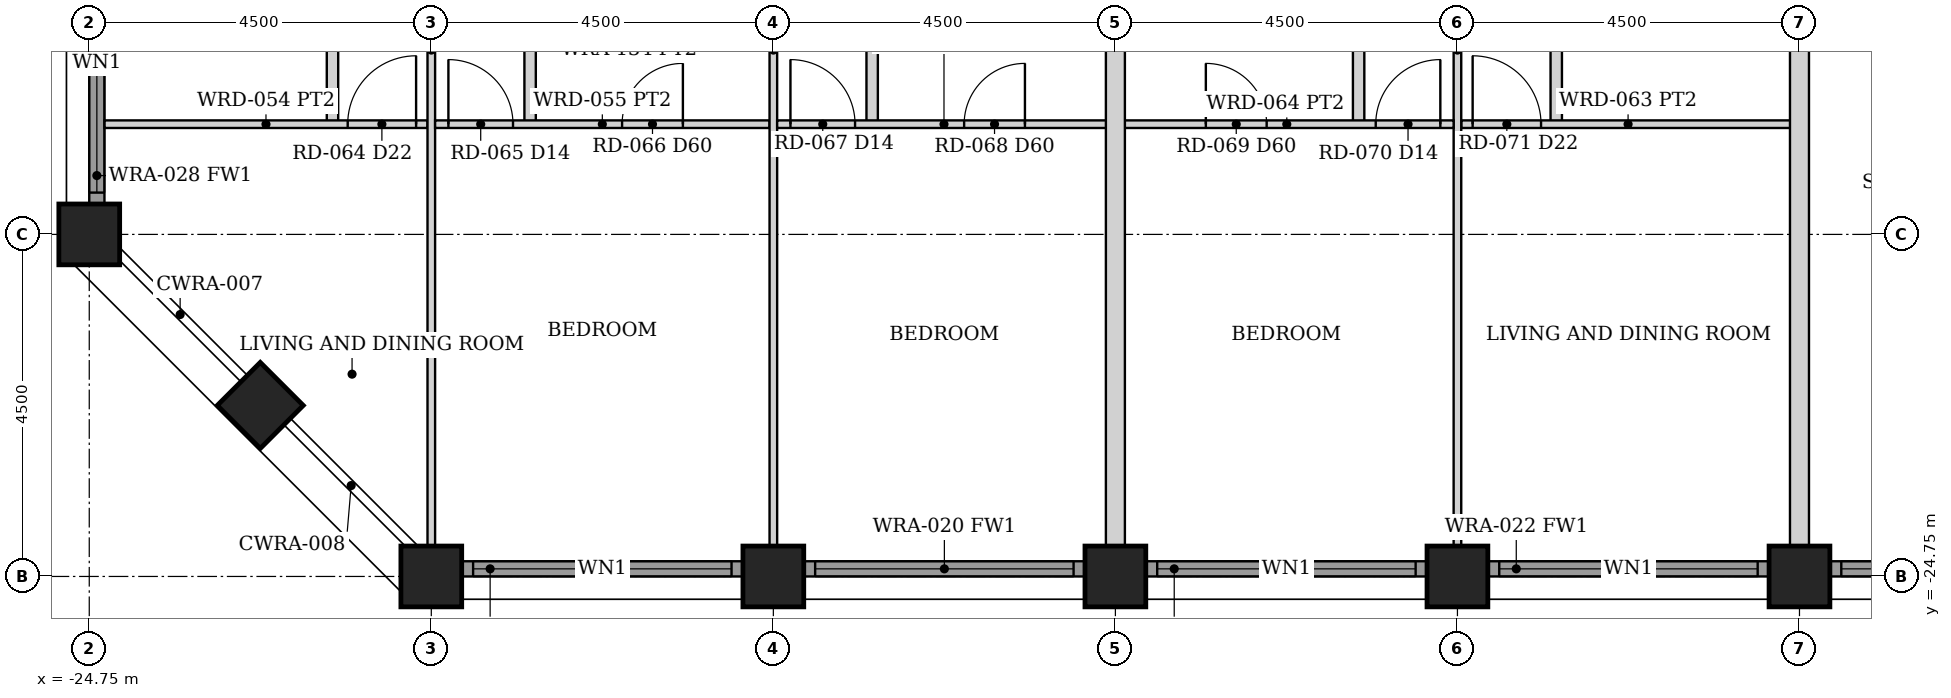
"""IFC4 building model, lengths in metres.
Left out: names, types, materials, properties, quantities, classifications, styles, units other than length and angle.
Written with IfcOpenShell. Run it as: python <this file> out.ifc"""

import sys

from ifc_helpers import new_model, si_unit, direction, frame, frame_2d, origin, origin_2d, place, context, subcontext, project, spatial, rectangle, hollow_rectangle, extrude, element, fill, save


model = new_model("IFC4")
c1 = context("Model", 3, precision=1e-05, world=origin(), true_north=direction((0.0, 1.0)))
c2 = subcontext(c1, "Body", "Model", "MODEL_VIEW")
j1 = project(units=[si_unit("LENGTHUNIT", "METRE"), si_unit("PLANEANGLEUNIT", "RADIAN")], contexts=[c1])
p1 = place(None, origin())
s1 = spatial("IfcSite", under=j1, at=p1, CompositionType="ELEMENT")
p2 = place(p1, origin())
s2 = spatial("IfcBuilding", under=s1, at=p2, CompositionType="ELEMENT")
p3 = place(p2, frame((0.0, 0.0, 58.0)))
s3 = spatial("IfcBuildingStorey", under=s2, at=p3, CompositionType="ELEMENT", Elevation=58.0)
for number, where, z_axis, x_axis in (
    (1, (-20.25, -24.75, 0.0), (0.0, 0.0, 1.0), (0.0, 1.0, 0.0)),
    (2, (-24.75, -20.25, 0.0), (0.0, 0.0, 1.0), (1.0, 0.0, 0.0)),
    (3, (-15.75, -24.75, 0.0), (0.0, 0.0, 1.0), (0.0, 1.0, 0.0)),
    (4, (-11.25, -24.75, 0.0), (0.0, 0.0, 1.0), (0.0, 1.0, 0.0)),
    (5, (-6.75, -24.75, 0.0), (0.0, 0.0, 1.0), (0.0, 1.0, 0.0)),
    (6, (-2.25, -24.75, 0.0), (0.0, 0.0, 1.0), (0.0, 1.0, 0.0)),
    (7, (-22.5, -22.5, 0.0), (0.0, 0.0, 1.0), (0.707, 0.707, 0.0)),
):
    element("IfcColumn", number, at=place(p3, frame(where, z_axis=z_axis, x_axis=x_axis)), inside=s3, PredefinedType="COLUMN", context=c2, shape_type="SweptSolid", body=[
        extrude(hollow_rectangle(XDim=0.8, YDim=0.8, WallThickness=0.06, at=origin_2d()), origin(), (0.0, 0.0, 1.0), 3.5),
    ])
p4 = place(p3, frame((-19.845, -24.65, 0.0), z_axis=(0.0, 0.0, 1.0), x_axis=(1.0, 0.0, 0.0)))
e8 = element("IfcWall", 8, at=p4, inside=s3, PredefinedType="SOLIDWALL", context=c2, shape_type="SweptSolid", body=[
    extrude(rectangle(XDim=3.69, YDim=0.2, at=frame_2d((1.845, 0.0))), origin(), (0.0, 0.0, 1.0), 2.379),
])
p5 = place(p4, frame((0.145, 0.0, 0.3)))
e9 = element("IfcOpeningElement", 9, at=p5, cuts=e8, PredefinedType="OPENING", context=c2, shape_type="SweptSolid", body=[
    extrude(rectangle(XDim=3.4, YDim=1.929, at=frame_2d((1.7, 0.964))), frame((0.0, 0.11, 0.0), z_axis=(0.0, -1.0, 0.0), x_axis=(1.0, 0.0, 0.0)), (0.0, 0.0, 1.0), 0.22),
])
p6 = place(p3, frame((-15.345, -24.65, 0.0), z_axis=(0.0, 0.0, 1.0), x_axis=(1.0, 0.0, 0.0)))
e10 = element("IfcWall", 10, at=p6, inside=s3, PredefinedType="SOLIDWALL", context=c2, shape_type="SweptSolid", body=[
    extrude(rectangle(XDim=3.69, YDim=0.2, at=frame_2d((1.845, 0.0))), origin(), (0.0, 0.0, 1.0), 2.379),
])
p7 = place(p6, frame((0.145, 0.0, 0.3)))
e11 = element("IfcOpeningElement", 11, at=p7, cuts=e10, PredefinedType="OPENING", context=c2, shape_type="SweptSolid", body=[
    extrude(rectangle(XDim=3.4, YDim=1.929, at=frame_2d((1.7, 0.964))), frame((0.0, 0.11, 0.0), z_axis=(0.0, -1.0, 0.0), x_axis=(1.0, 0.0, 0.0)), (0.0, 0.0, 1.0), 0.22),
])
p8 = place(p3, frame((-10.845, -24.65, 0.0), z_axis=(0.0, 0.0, 1.0), x_axis=(1.0, 0.0, 0.0)))
e12 = element("IfcWall", 12, at=p8, inside=s3, PredefinedType="SOLIDWALL", context=c2, shape_type="SweptSolid", body=[
    extrude(rectangle(XDim=3.69, YDim=0.2, at=frame_2d((1.845, 0.0))), origin(), (0.0, 0.0, 1.0), 2.379),
])
p9 = place(p8, frame((0.145, 0.0, 0.3)))
e13 = element("IfcOpeningElement", 13, at=p9, cuts=e12, PredefinedType="OPENING", context=c2, shape_type="SweptSolid", body=[
    extrude(rectangle(XDim=3.4, YDim=1.929, at=frame_2d((1.7, 0.964))), frame((0.0, 0.11, 0.0), z_axis=(0.0, -1.0, 0.0), x_axis=(1.0, 0.0, 0.0)), (0.0, 0.0, 1.0), 0.22),
])
p10 = place(p3, frame((-6.345, -24.65, 0.0), z_axis=(0.0, 0.0, 1.0), x_axis=(1.0, 0.0, 0.0)))
e14 = element("IfcWall", 14, at=p10, inside=s3, PredefinedType="SOLIDWALL", context=c2, shape_type="SweptSolid", body=[
    extrude(rectangle(XDim=3.69, YDim=0.2, at=frame_2d((1.845, 0.0))), origin(), (0.0, 0.0, 1.0), 2.379),
])
p11 = place(p10, frame((0.145, 0.0, 0.3)))
e15 = element("IfcOpeningElement", 15, at=p11, cuts=e14, PredefinedType="OPENING", context=c2, shape_type="SweptSolid", body=[
    extrude(rectangle(XDim=3.4, YDim=1.929, at=frame_2d((1.7, 0.964))), frame((0.0, 0.11, 0.0), z_axis=(0.0, -1.0, 0.0), x_axis=(1.0, 0.0, 0.0)), (0.0, 0.0, 1.0), 0.22),
])
p12 = place(p3, frame((-1.845, -24.65, 0.0), z_axis=(0.0, 0.0, 1.0), x_axis=(1.0, 0.0, 0.0)))
e16 = element("IfcWall", 16, at=p12, inside=s3, PredefinedType="SOLIDWALL", context=c2, shape_type="SweptSolid", body=[
    extrude(rectangle(XDim=3.69, YDim=0.2, at=frame_2d((1.845, 0.0))), origin(), (0.0, 0.0, 1.0), 2.379),
])
p13 = place(p12, frame((0.145, 0.0, 0.3)))
e17 = element("IfcOpeningElement", 17, at=p13, cuts=e16, PredefinedType="OPENING", context=c2, shape_type="SweptSolid", body=[
    extrude(rectangle(XDim=3.4, YDim=1.929, at=frame_2d((1.7, 0.964))), frame((0.0, 0.11, 0.0), z_axis=(0.0, -1.0, 0.0), x_axis=(1.0, 0.0, 0.0)), (0.0, 0.0, 1.0), 0.22),
])
p14 = place(p3, frame((-24.65, -19.845, 0.0), z_axis=(0.0, 0.0, 1.0), x_axis=(0.0, 1.0, 0.0)))
e18 = element("IfcWall", 18, at=p14, inside=s3, PredefinedType="SOLIDWALL", context=c2, shape_type="SweptSolid", body=[
    extrude(rectangle(XDim=3.69, YDim=0.2, at=frame_2d((1.845, 0.0))), origin(), (0.0, 0.0, 1.0), 2.379),
])
p15 = place(p14, frame((0.145, 0.0, 0.3)))
e19 = element("IfcOpeningElement", 19, at=p15, cuts=e18, PredefinedType="OPENING", context=c2, shape_type="SweptSolid", body=[
    extrude(rectangle(XDim=3.4, YDim=1.929, at=frame_2d((1.7, 0.964))), frame((0.0, 0.11, 0.0), z_axis=(0.0, -1.0, 0.0), x_axis=(1.0, 0.0, 0.0)), (0.0, 0.0, 1.0), 0.22),
])
p16 = place(p3, frame((-21.55, -18.8, 0.0), z_axis=(0.0, 0.0, 1.0), x_axis=(0.0, 1.0, 0.0)))
e20 = element("IfcWall", 20, at=p16, inside=s3, PredefinedType="PARTITIONING", context=c2, shape_type="SweptSolid", body=[
    extrude(rectangle(XDim=7.5, YDim=0.15, at=frame_2d((3.75, 0.0))), origin(), (0.0, 0.0, 1.0), 2.373),
])
p17 = place(p16, frame((3.3, 0.0, 0.0)))
e21 = element("IfcOpeningElement", 21, at=p17, cuts=e20, PredefinedType="OPENING", context=c2, shape_type="SweptSolid", body=[
    extrude(rectangle(XDim=0.9, YDim=2.1, at=frame_2d((0.45, 1.05))), frame((0.0, 0.085, 0.0), z_axis=(0.0, -1.0, 0.0), x_axis=(1.0, 0.0, 0.0)), (0.0, 0.0, 1.0), 0.17),
])
p18 = place(p3, frame((-24.55, -18.8, 0.0), z_axis=(0.0, 0.0, 1.0), x_axis=(1.0, 0.0, 0.0)))
e22 = element("IfcWall", 22, at=p18, inside=s3, PredefinedType="PARTITIONING", context=c2, shape_type="SweptSolid", body=[
    extrude(rectangle(XDim=4.25, YDim=0.1, at=frame_2d((2.125, 0.0))), origin(), (0.0, 0.0, 1.0), 2.373),
])
p19 = place(p18, frame((3.2, 0.0, 0.0)))
e23 = element("IfcOpeningElement", 23, at=p19, cuts=e22, PredefinedType="OPENING", context=c2, shape_type="SweptSolid", body=[
    extrude(rectangle(XDim=0.9, YDim=2.1, at=frame_2d((0.45, 1.05))), frame((0.0, 0.06, 0.0), z_axis=(0.0, -1.0, 0.0), x_axis=(1.0, 0.0, 0.0)), (0.0, 0.0, 1.0), 0.12),
])
p20 = place(p3, frame((-20.25, -24.35, 0.0), z_axis=(0.0, 0.0, 1.0), x_axis=(0.0, 1.0, 0.0)))
e24 = element("IfcWall", 24, at=p20, inside=s3, PredefinedType="PARTITIONING", context=c2, shape_type="SweptSolid", body=[
    extrude(rectangle(XDim=13.05, YDim=0.1, at=frame_2d((6.525, 0.0))), origin(), (0.0, 0.0, 1.0), 2.373),
])
p21 = place(p3, frame((-18.95, -18.8, 0.0), z_axis=(0.0, 0.0, 1.0), x_axis=(0.0, 1.0, 0.0)))
e25 = element("IfcWall", 25, at=p21, inside=s3, PredefinedType="PARTITIONING", context=c2, shape_type="SweptSolid", body=[
    extrude(rectangle(XDim=7.5, YDim=0.15, at=frame_2d((3.75, 0.0))), origin(), (0.0, 0.0, 1.0), 2.373),
])
p22 = place(p21, frame((5.75, 0.0, 0.0)))
e26 = element("IfcOpeningElement", 26, at=p22, cuts=e25, PredefinedType="OPENING", context=c2, shape_type="SweptSolid", body=[
    extrude(rectangle(XDim=0.9, YDim=2.1, at=frame_2d((0.45, 1.05))), frame((0.0, 0.085, 0.0), z_axis=(0.0, -1.0, 0.0), x_axis=(1.0, 0.0, 0.0)), (0.0, 0.0, 1.0), 0.17),
])
p23 = place(p3, frame((-20.2, -18.8, 0.0), z_axis=(0.0, 0.0, 1.0), x_axis=(1.0, 0.0, 0.0)))
e27 = element("IfcWall", 27, at=p23, inside=s3, PredefinedType="PARTITIONING", context=c2, shape_type="SweptSolid", body=[
    extrude(rectangle(XDim=4.4, YDim=0.1, at=frame_2d((2.2, 0.0))), origin(), (0.0, 0.0, 1.0), 2.373),
])
p24 = place(p23, frame((0.175, 0.0, 0.0)))
e28 = element("IfcOpeningElement", 28, at=p24, cuts=e27, PredefinedType="OPENING", context=c2, shape_type="SweptSolid", body=[
    extrude(rectangle(XDim=0.85, YDim=2.1, at=frame_2d((0.425, 1.05))), frame((0.0, 0.06, 0.0), z_axis=(0.0, -1.0, 0.0), x_axis=(1.0, 0.0, 0.0)), (0.0, 0.0, 1.0), 0.12),
])
p25 = place(p23, frame((2.46, 0.0, 0.0)))
e29 = element("IfcOpeningElement", 29, at=p25, cuts=e27, PredefinedType="OPENING", context=c2, shape_type="SweptSolid", body=[
    extrude(rectangle(XDim=0.8, YDim=2.1, at=frame_2d((0.4, 1.05))), frame((0.0, 0.06, 0.0), z_axis=(0.0, -1.0, 0.0), x_axis=(1.0, 0.0, 0.0)), (0.0, 0.0, 1.0), 0.12),
])
p26 = place(p3, frame((-15.75, -24.35, 0.0), z_axis=(0.0, 0.0, 1.0), x_axis=(0.0, 1.0, 0.0)))
e30 = element("IfcWall", 30, at=p26, inside=s3, PredefinedType="PARTITIONING", context=c2, shape_type="SweptSolid", body=[
    extrude(rectangle(XDim=13.05, YDim=0.1, at=frame_2d((6.525, 0.0))), origin(), (0.0, 0.0, 1.0), 2.373),
])
p27 = place(p3, frame((-14.45, -18.8, 0.0), z_axis=(0.0, 0.0, 1.0), x_axis=(0.0, 1.0, 0.0)))
e31 = element("IfcWall", 31, at=p27, inside=s3, PredefinedType="PARTITIONING", context=c2, shape_type="SweptSolid", body=[
    extrude(rectangle(XDim=7.5, YDim=0.15, at=frame_2d((3.75, 0.0))), origin(), (0.0, 0.0, 1.0), 2.373),
])
p28 = place(p27, frame((5.75, 0.0, 0.0)))
e32 = element("IfcOpeningElement", 32, at=p28, cuts=e31, PredefinedType="OPENING", context=c2, shape_type="SweptSolid", body=[
    extrude(rectangle(XDim=0.9, YDim=2.1, at=frame_2d((0.45, 1.05))), frame((0.0, 0.085, 0.0), z_axis=(0.0, -1.0, 0.0), x_axis=(1.0, 0.0, 0.0)), (0.0, 0.0, 1.0), 0.17),
])
p29 = place(p3, frame((-15.7, -18.8, 0.0), z_axis=(0.0, 0.0, 1.0), x_axis=(1.0, 0.0, 0.0)))
e33 = element("IfcWall", 33, at=p29, inside=s3, PredefinedType="PARTITIONING", context=c2, shape_type="SweptSolid", body=[
    extrude(rectangle(XDim=4.39, YDim=0.1, at=frame_2d((2.195, 0.0))), origin(), (0.0, 0.0, 1.0), 2.373),
])
p30 = place(p29, frame((0.175, 0.0, 0.0)))
e34 = element("IfcOpeningElement", 34, at=p30, cuts=e33, PredefinedType="OPENING", context=c2, shape_type="SweptSolid", body=[
    extrude(rectangle(XDim=0.85, YDim=2.1, at=frame_2d((0.425, 1.05))), frame((0.0, 0.06, 0.0), z_axis=(0.0, -1.0, 0.0), x_axis=(1.0, 0.0, 0.0)), (0.0, 0.0, 1.0), 0.12),
])
p31 = place(p29, frame((2.46, 0.0, 0.0)))
e35 = element("IfcOpeningElement", 35, at=p31, cuts=e33, PredefinedType="OPENING", context=c2, shape_type="SweptSolid", body=[
    extrude(rectangle(XDim=0.8, YDim=2.1, at=frame_2d((0.4, 1.05))), frame((0.0, 0.06, 0.0), z_axis=(0.0, -1.0, 0.0), x_axis=(1.0, 0.0, 0.0)), (0.0, 0.0, 1.0), 0.12),
])
p32 = place(p3, frame((-5.45, -18.8, 0.0), z_axis=(0.0, 0.0, 1.0), x_axis=(0.0, 1.0, 0.0)))
e36 = element("IfcWall", 36, at=p32, inside=s3, PredefinedType="PARTITIONING", context=c2, shape_type="SweptSolid", body=[
    extrude(rectangle(XDim=7.5, YDim=0.15, at=frame_2d((3.75, 0.0))), origin(), (0.0, 0.0, 1.0), 2.373),
])
p33 = place(p32, frame((3.3, 0.0, 0.0)))
e37 = element("IfcOpeningElement", 37, at=p33, cuts=e36, PredefinedType="OPENING", context=c2, shape_type="SweptSolid", body=[
    extrude(rectangle(XDim=0.9, YDim=2.1, at=frame_2d((0.45, 1.05))), frame((0.0, 0.085, 0.0), z_axis=(0.0, -1.0, 0.0), x_axis=(1.0, 0.0, 0.0)), (0.0, 0.0, 1.0), 0.17),
])
p34 = place(p3, frame((-6.7, -18.8, 0.0), z_axis=(0.0, 0.0, 1.0), x_axis=(1.0, 0.0, 0.0)))
e38 = element("IfcWall", 38, at=p34, inside=s3, PredefinedType="PARTITIONING", context=c2, shape_type="SweptSolid", body=[
    extrude(rectangle(XDim=4.39, YDim=0.1, at=frame_2d((2.195, 0.0))), origin(), (0.0, 0.0, 1.0), 2.373),
])
p35 = place(p34, frame((0.15, 0.0, 0.0)))
e39 = element("IfcOpeningElement", 39, at=p35, cuts=e38, PredefinedType="OPENING", context=c2, shape_type="SweptSolid", body=[
    extrude(rectangle(XDim=0.9, YDim=2.1, at=frame_2d((0.45, 1.05))), frame((0.0, 0.06, 0.0), z_axis=(0.0, -1.0, 0.0), x_axis=(1.0, 0.0, 0.0)), (0.0, 0.0, 1.0), 0.12),
])
p36 = place(p3, frame((-6.75, -24.35, 0.0), z_axis=(0.0, 0.0, 1.0), x_axis=(0.0, 1.0, 0.0)))
e40 = element("IfcWall", 40, at=p36, inside=s3, PredefinedType="PARTITIONING", context=c2, shape_type="SweptSolid", body=[
    extrude(rectangle(XDim=13.05, YDim=0.1, at=frame_2d((6.525, 0.0))), origin(), (0.0, 0.0, 1.0), 2.373),
])
p37 = place(p3, frame((-8.05, -18.8, 0.0), z_axis=(0.0, 0.0, 1.0), x_axis=(0.0, 1.0, 0.0)))
e41 = element("IfcWall", 41, at=p37, inside=s3, PredefinedType="PARTITIONING", context=c2, shape_type="SweptSolid", body=[
    extrude(rectangle(XDim=7.5, YDim=0.15, at=frame_2d((3.75, 0.0))), origin(), (0.0, 0.0, 1.0), 2.373),
])
p38 = place(p37, frame((5.75, 0.0, 0.0)))
e42 = element("IfcOpeningElement", 42, at=p38, cuts=e41, PredefinedType="OPENING", context=c2, shape_type="SweptSolid", body=[
    extrude(rectangle(XDim=0.9, YDim=2.1, at=frame_2d((0.45, 1.05))), frame((0.0, 0.085, 0.0), z_axis=(0.0, -1.0, 0.0), x_axis=(1.0, 0.0, 0.0)), (0.0, 0.0, 1.0), 0.17),
])
p39 = place(p3, frame((-11.19, -18.8, 0.0), z_axis=(0.0, 0.0, 1.0), x_axis=(1.0, 0.0, 0.0)))
e43 = element("IfcWall", 43, at=p39, inside=s3, PredefinedType="PARTITIONING", context=c2, shape_type="SweptSolid", body=[
    extrude(rectangle(XDim=4.39, YDim=0.1, at=frame_2d((2.195, 0.0))), origin(), (0.0, 0.0, 1.0), 2.373),
])
p40 = place(p39, frame((3.365, 0.0, 0.0)))
e44 = element("IfcOpeningElement", 44, at=p40, cuts=e43, PredefinedType="OPENING", context=c2, shape_type="SweptSolid", body=[
    extrude(rectangle(XDim=0.85, YDim=2.1, at=frame_2d((0.425, 1.05))), frame((0.0, 0.06, 0.0), z_axis=(0.0, -1.0, 0.0), x_axis=(1.0, 0.0, 0.0)), (0.0, 0.0, 1.0), 0.12),
])
p41 = place(p39, frame((1.13, 0.0, 0.0)))
e45 = element("IfcOpeningElement", 45, at=p41, cuts=e43, PredefinedType="OPENING", context=c2, shape_type="SweptSolid", body=[
    extrude(rectangle(XDim=0.8, YDim=2.1, at=frame_2d((0.4, 1.05))), frame((0.0, 0.06, 0.0), z_axis=(0.0, -1.0, 0.0), x_axis=(1.0, 0.0, 0.0)), (0.0, 0.0, 1.0), 0.12),
])
for number, where, z_axis, x_axis in (
    (46, (-11.25, -24.35, 0.0), (0.0, 0.0, 1.0), (0.0, 1.0, 0.0)),
    (47, (-2.25, -24.35, 0.0), (0.0, 0.0, 1.0), (0.0, 1.0, 0.0)),
):
    element("IfcWall", number, at=place(p3, frame(where, z_axis=z_axis, x_axis=x_axis)), inside=s3, PredefinedType="PARTITIONING", context=c2, shape_type="SweptSolid", body=[
        extrude(rectangle(XDim=15.15, YDim=0.25, at=frame_2d((7.575, 0.0))), origin(), (0.0, 0.0, 1.0), 2.373),
    ])
p42 = place(p5, origin())
e48 = element("IfcWindow", 48, at=p42, inside=s3, PartitioningType="SINGLE_PANEL", PredefinedType="WINDOW", context=c2, shape_type="SweptSolid", body=[
    extrude(rectangle(XDim=3.4, YDim=1.929, at=frame_2d((1.7, 0.964))), frame((0.0, 0.03, 0.0), z_axis=(0.0, -1.0, 0.0), x_axis=(1.0, 0.0, 0.0)), (0.0, 0.0, 1.0), 0.06),
])
fill(e9, e48)
p43 = place(p7, origin())
e49 = element("IfcWindow", 49, at=p43, inside=s3, PartitioningType="SINGLE_PANEL", PredefinedType="WINDOW", context=c2, shape_type="SweptSolid", body=[
    extrude(rectangle(XDim=3.4, YDim=1.929, at=frame_2d((1.7, 0.964))), frame((0.0, 0.03, 0.0), z_axis=(0.0, -1.0, 0.0), x_axis=(1.0, 0.0, 0.0)), (0.0, 0.0, 1.0), 0.06),
])
fill(e11, e49)
p44 = place(p9, origin())
e50 = element("IfcWindow", 50, at=p44, inside=s3, PartitioningType="SINGLE_PANEL", PredefinedType="WINDOW", context=c2, shape_type="SweptSolid", body=[
    extrude(rectangle(XDim=3.4, YDim=1.929, at=frame_2d((1.7, 0.964))), frame((0.0, 0.03, 0.0), z_axis=(0.0, -1.0, 0.0), x_axis=(1.0, 0.0, 0.0)), (0.0, 0.0, 1.0), 0.06),
])
fill(e13, e50)
p45 = place(p11, origin())
e51 = element("IfcWindow", 51, at=p45, inside=s3, PartitioningType="SINGLE_PANEL", PredefinedType="WINDOW", context=c2, shape_type="SweptSolid", body=[
    extrude(rectangle(XDim=3.4, YDim=1.929, at=frame_2d((1.7, 0.964))), frame((0.0, 0.03, 0.0), z_axis=(0.0, -1.0, 0.0), x_axis=(1.0, 0.0, 0.0)), (0.0, 0.0, 1.0), 0.06),
])
fill(e15, e51)
p46 = place(p13, origin())
e52 = element("IfcWindow", 52, at=p46, inside=s3, PartitioningType="SINGLE_PANEL", PredefinedType="WINDOW", context=c2, shape_type="SweptSolid", body=[
    extrude(rectangle(XDim=3.4, YDim=1.929, at=frame_2d((1.7, 0.964))), frame((0.0, 0.03, 0.0), z_axis=(0.0, -1.0, 0.0), x_axis=(1.0, 0.0, 0.0)), (0.0, 0.0, 1.0), 0.06),
])
fill(e17, e52)
p47 = place(p15, origin())
e53 = element("IfcWindow", 53, at=p47, inside=s3, PartitioningType="SINGLE_PANEL", PredefinedType="WINDOW", context=c2, shape_type="SweptSolid", body=[
    extrude(rectangle(XDim=3.4, YDim=1.929, at=frame_2d((1.7, 0.964))), frame((0.0, 0.03, 0.0), z_axis=(0.0, -1.0, 0.0), x_axis=(1.0, 0.0, 0.0)), (0.0, 0.0, 1.0), 0.06),
])
fill(e19, e53)
p48 = place(p19, origin())
e54 = element("IfcDoor", 54, at=p48, inside=s3, OperationType="SINGLE_SWING_RIGHT", PredefinedType="DOOR", context=c2, shape_type="SweptSolid", body=[
    extrude(rectangle(XDim=0.9, YDim=2.1, at=frame_2d((0.45, 1.05))), frame((0.0, 0.025, 0.0), z_axis=(0.0, -1.0, 0.0), x_axis=(1.0, 0.0, 0.0)), (0.0, 0.0, 1.0), 0.05),
])
fill(e23, e54)
p49 = place(p24, origin())
e55 = element("IfcDoor", 55, at=p49, inside=s3, OperationType="SINGLE_SWING_LEFT", PredefinedType="DOOR", context=c2, shape_type="SweptSolid", body=[
    extrude(rectangle(XDim=0.85, YDim=2.1, at=frame_2d((0.425, 1.05))), frame((0.0, 0.025, 0.0), z_axis=(0.0, -1.0, 0.0), x_axis=(1.0, 0.0, 0.0)), (0.0, 0.0, 1.0), 0.05),
])
fill(e28, e55)
p50 = place(p25, origin())
e56 = element("IfcDoor", 56, at=p50, inside=s3, OperationType="SINGLE_SWING_RIGHT", PredefinedType="DOOR", context=c2, shape_type="SweptSolid", body=[
    extrude(rectangle(XDim=0.8, YDim=2.1, at=frame_2d((0.4, 1.05))), frame((0.0, 0.025, 0.0), z_axis=(0.0, -1.0, 0.0), x_axis=(1.0, 0.0, 0.0)), (0.0, 0.0, 1.0), 0.05),
])
fill(e29, e56)
p51 = place(p30, origin())
e57 = element("IfcDoor", 57, at=p51, inside=s3, OperationType="SINGLE_SWING_LEFT", PredefinedType="DOOR", context=c2, shape_type="SweptSolid", body=[
    extrude(rectangle(XDim=0.85, YDim=2.1, at=frame_2d((0.425, 1.05))), frame((0.0, 0.025, 0.0), z_axis=(0.0, -1.0, 0.0), x_axis=(1.0, 0.0, 0.0)), (0.0, 0.0, 1.0), 0.05),
])
fill(e34, e57)
p52 = place(p31, origin())
e58 = element("IfcDoor", 58, at=p52, inside=s3, OperationType="SINGLE_SWING_RIGHT", PredefinedType="DOOR", context=c2, shape_type="SweptSolid", body=[
    extrude(rectangle(XDim=0.8, YDim=2.1, at=frame_2d((0.4, 1.05))), frame((0.0, 0.025, 0.0), z_axis=(0.0, -1.0, 0.0), x_axis=(1.0, 0.0, 0.0)), (0.0, 0.0, 1.0), 0.05),
])
fill(e35, e58)
p53 = place(p35, origin())
e59 = element("IfcDoor", 59, at=p53, inside=s3, OperationType="SINGLE_SWING_LEFT", PredefinedType="DOOR", context=c2, shape_type="SweptSolid", body=[
    extrude(rectangle(XDim=0.9, YDim=2.1, at=frame_2d((0.45, 1.05))), frame((0.0, 0.025, 0.0), z_axis=(0.0, -1.0, 0.0), x_axis=(1.0, 0.0, 0.0)), (0.0, 0.0, 1.0), 0.05),
])
fill(e39, e59)
p54 = place(p40, origin())
e60 = element("IfcDoor", 60, at=p54, inside=s3, OperationType="SINGLE_SWING_RIGHT", PredefinedType="DOOR", context=c2, shape_type="SweptSolid", body=[
    extrude(rectangle(XDim=0.85, YDim=2.1, at=frame_2d((0.425, 1.05))), frame((0.0, 0.025, 0.0), z_axis=(0.0, -1.0, 0.0), x_axis=(1.0, 0.0, 0.0)), (0.0, 0.0, 1.0), 0.05),
])
fill(e44, e60)
p55 = place(p41, origin())
e61 = element("IfcDoor", 61, at=p55, inside=s3, OperationType="SINGLE_SWING_LEFT", PredefinedType="DOOR", context=c2, shape_type="SweptSolid", body=[
    extrude(rectangle(XDim=0.8, YDim=2.1, at=frame_2d((0.4, 1.05))), frame((0.0, 0.025, 0.0), z_axis=(0.0, -1.0, 0.0), x_axis=(1.0, 0.0, 0.0)), (0.0, 0.0, 1.0), 0.05),
])
fill(e45, e61)
save(model, sys.argv[1])
